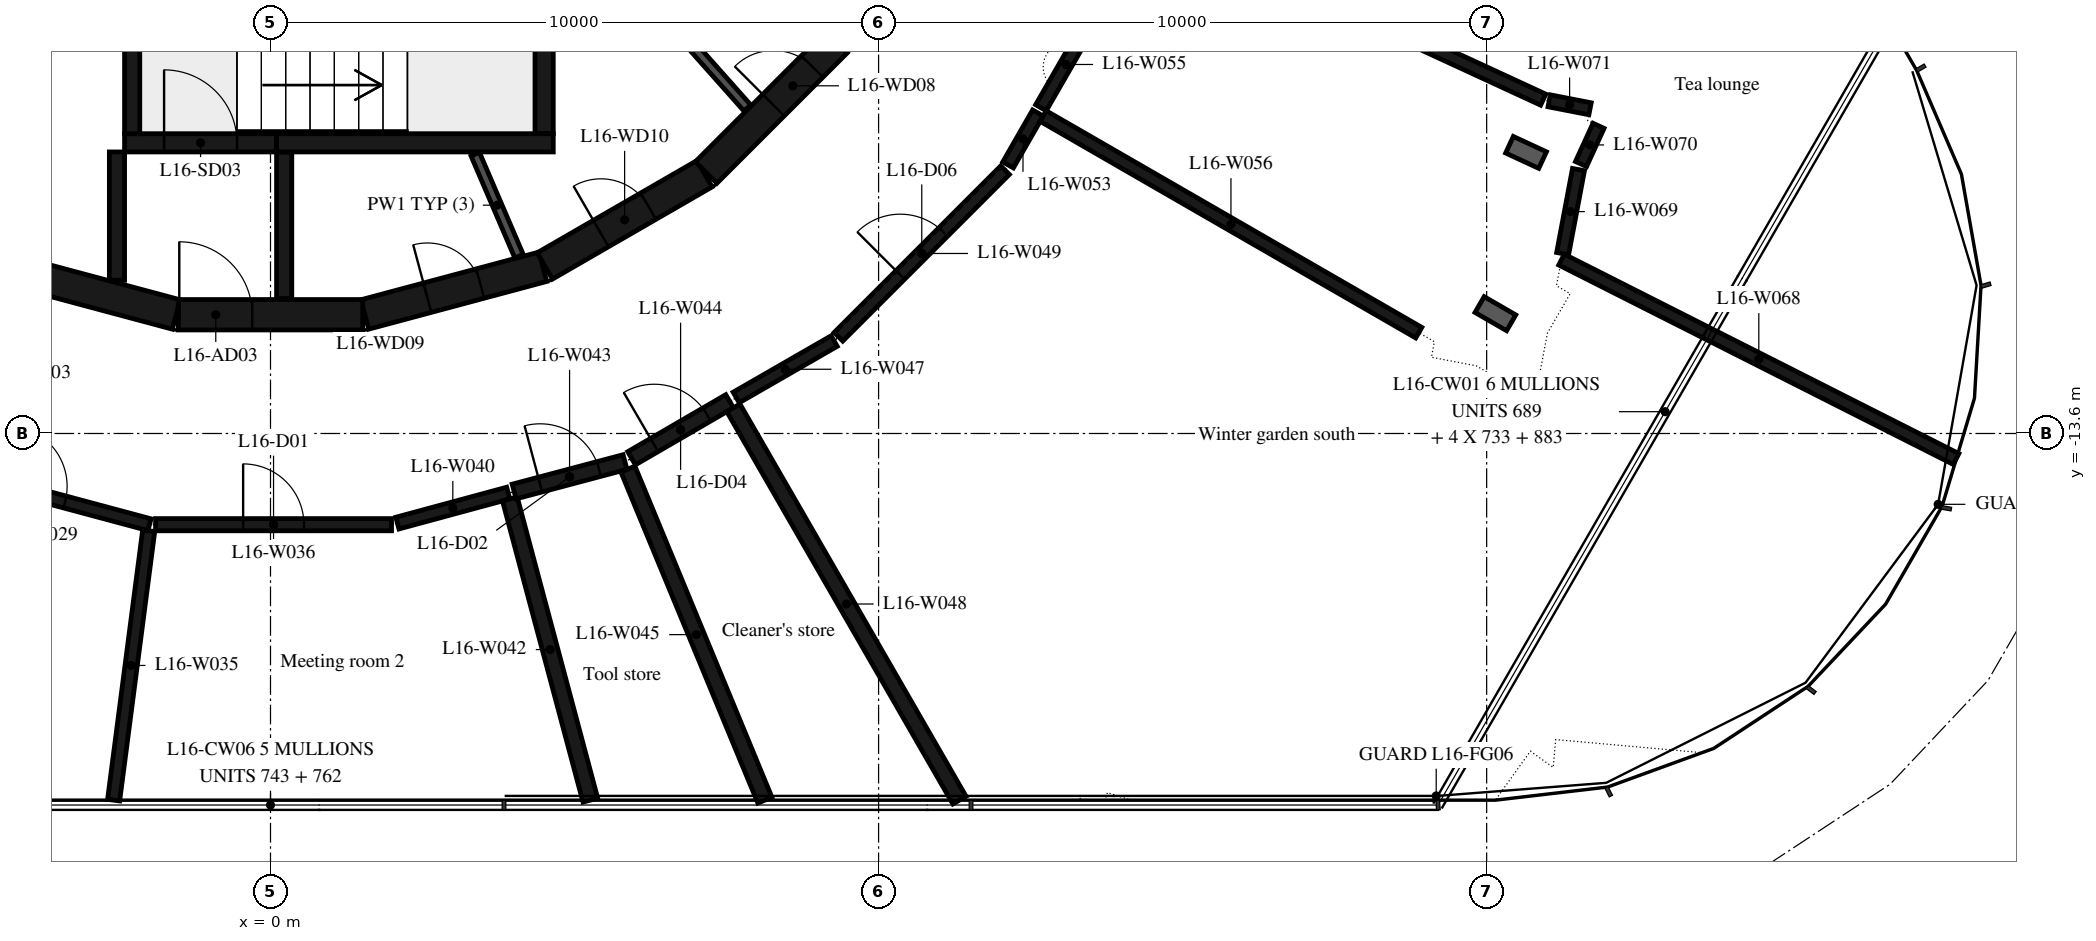
"""IFC4 building model, lengths in metres.
Left out: names, types, materials, properties, quantities, classifications, styles, units other than length and angle.
Written with IfcOpenShell. Run it as: python <this file> out.ifc"""

import sys

from ifc_helpers import new_model, si_unit, direction, frame, frame_2d, origin, place, context, subcontext, project, spatial, rectangle, extrude, element, fill, save


model = new_model("IFC4")
c1 = context("Model", 3, precision=1e-05, world=origin(), true_north=direction((0.0, 1.0)))
c2 = subcontext(c1, "Body", "Model", "MODEL_VIEW")
j1 = project(units=[si_unit("LENGTHUNIT", "METRE"), si_unit("PLANEANGLEUNIT", "RADIAN")], contexts=[c1])
p1 = place(None, origin())
s1 = spatial("IfcSite", under=j1, at=p1, CompositionType="ELEMENT")
p2 = place(p1, origin())
s2 = spatial("IfcBuilding", under=s1, at=p2, CompositionType="ELEMENT")
p3 = place(p2, frame((0.0, 0.0, 69.9)))
s3 = spatial("IfcBuildingStorey", under=s2, at=p3, CompositionType="ELEMENT", Elevation=69.9)
p4 = place(p3, frame((1.55, -11.643, 0.0), z_axis=(0.0, 0.0, 1.0), x_axis=(0.965948410781, 0.258734743916, 0.0)))
e1 = element("IfcWall", 1, at=p4, inside=s3, PredefinedType="SHEAR", context=c2, shape_type="SweptSolid", body=[
    extrude(rectangle(XDim=3.033, YDim=0.5, at=frame_2d((1.516, 0.0))), origin(), (0.0, 0.0, 1.0), 6.35),
])
p5 = place(p4, frame((1.066, 0.0, 0.0)))
e2 = element("IfcOpeningElement", 2, at=p5, cuts=e1, PredefinedType="OPENING", context=c2, shape_type="SweptSolid", body=[
    extrude(rectangle(XDim=0.9, YDim=2.1, at=frame_2d((0.45, 1.05))), frame((0.0, 0.26, 0.0), z_axis=(0.0, -1.0, 0.0), x_axis=(1.0, 0.0, 0.0)), (0.0, 0.0, 1.0), 0.52),
])
p6 = place(p3, frame((4.51, -10.845, 0.0), z_axis=(0.0, 0.0, 1.0), x_axis=(0.865975092491, 0.500087131594, 0.0)))
e3 = element("IfcWall", 3, at=p6, inside=s3, PredefinedType="SHEAR", context=c2, shape_type="SweptSolid", body=[
    extrude(rectangle(XDim=3.033, YDim=0.5, at=frame_2d((1.516, 0.0))), origin(), (0.0, 0.0, 1.0), 6.35),
])
p7 = place(p6, frame((1.066, 0.0, 0.0)))
e4 = element("IfcOpeningElement", 4, at=p7, cuts=e3, PredefinedType="OPENING", context=c2, shape_type="SweptSolid", body=[
    extrude(rectangle(XDim=0.9, YDim=2.1, at=frame_2d((0.45, 1.05))), frame((0.0, 0.26, 0.0), z_axis=(0.0, -1.0, 0.0), x_axis=(1.0, 0.0, 0.0)), (0.0, 0.0, 1.0), 0.52),
])
p8 = place(p3, frame((7.164, -9.308, 0.0), z_axis=(0.0, 0.0, 1.0), x_axis=(0.707106781187, 0.707106781187, 0.0)))
e5 = element("IfcWall", 5, at=p8, inside=s3, PredefinedType="SHEAR", context=c2, shape_type="SweptSolid", body=[
    extrude(rectangle(XDim=3.032, YDim=0.5, at=frame_2d((1.516, 0.0))), origin(), (0.0, 0.0, 1.0), 6.35),
])
p9 = place(p8, frame((1.566, 0.0, 0.0)))
e6 = element("IfcOpeningElement", 6, at=p9, cuts=e5, PredefinedType="OPENING", context=c2, shape_type="SweptSolid", body=[
    extrude(rectangle(XDim=0.9, YDim=2.1, at=frame_2d((0.45, 1.05))), frame((0.0, 0.26, 0.0), z_axis=(0.0, -1.0, 0.0), x_axis=(1.0, 0.0, 0.0)), (0.0, 0.0, 1.0), 0.52),
])
p10 = place(p3, frame((-4.479, -10.858, 0.0), z_axis=(0.0, 0.0, 1.0), x_axis=(0.965948410781, -0.258734743916, 0.0)))
e7 = element("IfcWall", 7, at=p10, inside=s3, PredefinedType="SHEAR", context=c2, shape_type="SweptSolid", body=[
    extrude(rectangle(XDim=3.033, YDim=0.5, at=frame_2d((1.516, 0.0))), origin(), (0.0, 0.0, 1.0), 6.35),
])
p11 = place(p3, frame((-1.516, -11.647, 0.0), z_axis=(0.0, 0.0, 1.0), x_axis=(1.0, 0.0, 0.0)))
e8 = element("IfcWall", 8, at=p11, inside=s3, PredefinedType="SHEAR", context=c2, shape_type="SweptSolid", body=[
    extrude(rectangle(XDim=3.033, YDim=0.5, at=frame_2d((1.516, 0.0))), origin(), (0.0, 0.0, 1.0), 6.35),
])
p12 = place(p11, frame((0.016, 0.0, 0.0)))
e9 = element("IfcOpeningElement", 9, at=p12, cuts=e8, PredefinedType="OPENING", context=c2, shape_type="SweptSolid", body=[
    extrude(rectangle(XDim=1.2, YDim=2.1, at=frame_2d((0.6, 1.05))), frame((0.0, 0.26, 0.0), z_axis=(0.0, -1.0, 0.0), x_axis=(1.0, 0.0, 0.0)), (0.0, 0.0, 1.0), 0.52),
])
p13 = place(p3, frame((-2.275, -8.67, 0.0), z_axis=(0.0, 0.0, 1.0), x_axis=(0.0, 1.0, 0.0)))
e10 = element("IfcWall", 10, at=p13, inside=s3, PredefinedType="SHEAR", context=c2, shape_type="SweptSolid", body=[
    extrude(rectangle(XDim=3.32, YDim=0.25, at=frame_2d((1.66, 0.0))), origin(), (0.0, 0.0, 1.0), 6.35),
])
p14 = place(p3, frame((4.5, -8.67, 0.0), z_axis=(0.0, 0.0, 1.0), x_axis=(0.0, 1.0, 0.0)))
e11 = element("IfcWall", 11, at=p14, inside=s3, PredefinedType="SHEAR", context=c2, shape_type="SweptSolid", body=[
    extrude(rectangle(XDim=3.32, YDim=0.3, at=frame_2d((1.66, 0.0))), origin(), (0.0, 0.0, 1.0), 6.35),
])
p15 = place(p3, frame((0.1, -8.82, 0.0), z_axis=(0.0, 0.0, 1.0), x_axis=(1.0, 0.0, 0.0)))
e12 = element("IfcWall", 12, at=p15, inside=s3, PredefinedType="SHEAR", context=c2, shape_type="SweptSolid", body=[
    extrude(rectangle(XDim=4.55, YDim=0.3, at=frame_2d((2.275, 0.0))), origin(), (0.0, 0.0, 1.0), 6.35),
])
p16 = place(p3, frame((-2.4, -8.82, 0.0), z_axis=(0.0, 0.0, 1.0), x_axis=(1.0, 0.0, 0.0)))
e13 = element("IfcWall", 13, at=p16, inside=s3, PredefinedType="SHEAR", context=c2, shape_type="SweptSolid", body=[
    extrude(rectangle(XDim=2.5, YDim=0.3, at=frame_2d((1.25, 0.0))), origin(), (0.0, 0.0, 1.0), 6.35),
])
p17 = place(p16, frame((0.65, 0.0, 0.0)))
e14 = element("IfcOpeningElement", 14, at=p17, cuts=e13, PredefinedType="OPENING", context=c2, shape_type="SweptSolid", body=[
    extrude(rectangle(XDim=1.2, YDim=2.1, at=frame_2d((0.6, 1.05))), frame((0.0, 0.16, 0.0), z_axis=(0.0, -1.0, 0.0), x_axis=(1.0, 0.0, 0.0)), (0.0, 0.0, 1.0), 0.32),
])
p18 = place(p3, frame((-2.525, -8.97, 0.0), z_axis=(0.0, 0.0, 1.0), x_axis=(0.0, -1.0, 0.0)))
e15 = element("IfcWall", 15, at=p18, inside=s3, PredefinedType="SHEAR", context=c2, shape_type="SweptSolid", body=[
    extrude(rectangle(XDim=2.11, YDim=0.25, at=frame_2d((1.055, 0.0))), origin(), (0.0, 0.0, 1.0), 6.35),
])
p19 = place(p3, frame((0.225, -8.97, 0.0), z_axis=(0.0, 0.0, 1.0), x_axis=(0.0, -1.0, 0.0)))
e16 = element("IfcWall", 16, at=p19, inside=s3, PredefinedType="SHEAR", context=c2, shape_type="SweptSolid", body=[
    extrude(rectangle(XDim=2.41, YDim=0.25, at=frame_2d((1.205, 0.0))), origin(), (0.0, 0.0, 1.0), 6.35),
])
p20 = place(p3, frame((7.842, -8.248, 0.0), z_axis=(0.0, 0.0, 1.0), x_axis=(-0.66446128181, 0.747322691329, 0.0)))
e17 = element("IfcWall", 17, at=p20, inside=s3, PredefinedType="PARTITIONING", context=c2, shape_type="SweptSolid", body=[
    extrude(rectangle(XDim=4.198, YDim=0.15, at=frame_2d((2.099, 0.0))), origin(), (0.0, 0.0, 1.0), 6.35),
])
p21 = place(p3, frame((3.367, -9.007, 0.0), z_axis=(0.0, 0.0, 1.0), x_axis=(0.394387482265, -0.918944238696, 0.0)))
e18 = element("IfcWall", 18, at=p21, inside=s3, PredefinedType="PARTITIONING", context=c2, shape_type="SweptSolid", body=[
    extrude(rectangle(XDim=1.825, YDim=0.15, at=frame_2d((0.913, 0.0))), origin(), (0.0, 0.0, 1.0), 6.35),
])
p22 = place(p3, frame((-5.733, -14.096, 0.0), z_axis=(0.0, 0.0, 1.0), x_axis=(0.96585437197, -0.259085569159, 0.0)))
e19 = element("IfcWall", 19, at=p22, inside=s3, PredefinedType="PARTITIONING", context=c2, shape_type="SweptSolid", body=[
    extrude(rectangle(XDim=3.876, YDim=0.2, at=frame_2d((1.938, 0.0))), origin(), (0.0, 0.0, 1.0), 6.35),
])
p23 = place(p22, frame((1.438, 0.0, 0.0)))
e20 = element("IfcOpeningElement", 20, at=p23, cuts=e19, PredefinedType="OPENING", context=c2, shape_type="SweptSolid", body=[
    extrude(rectangle(XDim=1.0, YDim=2.1, at=frame_2d((0.5, 1.05))), frame((0.0, 0.11, 0.0), z_axis=(0.0, -1.0, 0.0), x_axis=(1.0, 0.0, 0.0)), (0.0, 0.0, 1.0), 0.22),
])
p24 = place(p3, frame((-2.003, -15.199, 0.0), z_axis=(0.0, 0.0, 1.0), x_axis=(-0.129170993983, -0.991622334517, 0.0)))
e21 = element("IfcWall", 21, at=p24, inside=s3, PredefinedType="PARTITIONING", context=c2, shape_type="SweptSolid", body=[
    extrude(rectangle(XDim=4.468, YDim=0.2, at=frame_2d((2.234, 0.0))), origin(), (0.0, 0.0, 1.0), 6.35),
])
p25 = place(p3, frame((-1.89, -15.1, 0.0), z_axis=(0.0, 0.0, 1.0), x_axis=(1.0, 0.0, 0.0)))
e22 = element("IfcWall", 22, at=p25, inside=s3, PredefinedType="PARTITIONING", context=c2, shape_type="SweptSolid", body=[
    extrude(rectangle(XDim=3.88, YDim=0.2, at=frame_2d((1.94, 0.0))), origin(), (0.0, 0.0, 1.0), 6.35),
])
p26 = place(p25, frame((1.44, 0.0, 0.0)))
e23 = element("IfcOpeningElement", 23, at=p26, cuts=e22, PredefinedType="OPENING", context=c2, shape_type="SweptSolid", body=[
    extrude(rectangle(XDim=1.0, YDim=2.1, at=frame_2d((0.5, 1.05))), frame((0.0, 0.11, 0.0), z_axis=(0.0, -1.0, 0.0), x_axis=(1.0, 0.0, 0.0)), (0.0, 0.0, 1.0), 0.22),
])
p27 = place(p3, frame((2.086, -15.074, 0.0), z_axis=(0.0, 0.0, 1.0), x_axis=(0.965221616417, 0.261433033875, 0.0)))
e24 = element("IfcWall", 24, at=p27, inside=s3, PredefinedType="PARTITIONING", context=c2, shape_type="SweptSolid", body=[
    extrude(rectangle(XDim=1.889, YDim=0.2, at=frame_2d((0.945, 0.0))), origin(), (0.0, 0.0, 1.0), 6.35),
])
p28 = place(p3, frame((3.936, -14.677, 0.0), z_axis=(0.0, 0.0, 1.0), x_axis=(0.258267180327, -0.966073529068, 0.0)))
e25 = element("IfcWall", 25, at=p28, inside=s3, PredefinedType="PARTITIONING", context=c2, shape_type="SweptSolid", body=[
    extrude(rectangle(XDim=5.127, YDim=0.25, at=frame_2d((2.564, 0.0))), origin(), (0.0, 0.0, 1.0), 6.35),
])
p29 = place(p3, frame((4.007, -14.554, 0.0), z_axis=(0.0, 0.0, 1.0), x_axis=(0.966483621923, 0.256728277667, 0.0)))
e26 = element("IfcWall", 26, at=p29, inside=s3, PredefinedType="PARTITIONING", context=c2, shape_type="SweptSolid", body=[
    extrude(rectangle(XDim=1.887, YDim=0.25, at=frame_2d((0.943, 0.0))), origin(), (0.0, 0.0, 1.0), 6.35),
])
p30 = place(p29, frame((0.443, 0.0, 0.0)))
e27 = element("IfcOpeningElement", 27, at=p30, cuts=e26, PredefinedType="OPENING", context=c2, shape_type="SweptSolid", body=[
    extrude(rectangle(XDim=1.0, YDim=2.1, at=frame_2d((0.5, 1.05))), frame((0.0, 0.135, 0.0), z_axis=(0.0, -1.0, 0.0), x_axis=(1.0, 0.0, 0.0)), (0.0, 0.0, 1.0), 0.27),
])
p31 = place(p3, frame((5.938, -14.007, 0.0), z_axis=(0.0, 0.0, 1.0), x_axis=(0.864561429024, 0.502527148962, 0.0)))
e28 = element("IfcWall", 28, at=p31, inside=s3, PredefinedType="PARTITIONING", context=c2, shape_type="SweptSolid", body=[
    extrude(rectangle(XDim=1.865, YDim=0.25, at=frame_2d((0.932, 0.0))), origin(), (0.0, 0.0, 1.0), 6.35),
])
p32 = place(p31, frame((0.432, 0.0, 0.0)))
e29 = element("IfcOpeningElement", 29, at=p32, cuts=e28, PredefinedType="OPENING", context=c2, shape_type="SweptSolid", body=[
    extrude(rectangle(XDim=1.0, YDim=2.1, at=frame_2d((0.5, 1.05))), frame((0.0, 0.135, 0.0), z_axis=(0.0, -1.0, 0.0), x_axis=(1.0, 0.0, 0.0)), (0.0, 0.0, 1.0), 0.27),
])
p33 = place(p3, frame((5.878, -14.186, 0.0), z_axis=(0.0, 0.0, 1.0), x_axis=(0.382260291958, -0.924054689503, 0.0)))
e30 = element("IfcWall", 30, at=p33, inside=s3, PredefinedType="PARTITIONING", context=c2, shape_type="SweptSolid", body=[
    extrude(rectangle(XDim=5.892, YDim=0.25, at=frame_2d((2.946, 0.0))), origin(), (0.0, 0.0, 1.0), 6.35),
])
p34 = place(p3, frame((7.658, -13.008, 0.0), z_axis=(0.0, 0.0, 1.0), x_axis=(0.86671190811, 0.498809049979, 0.0)))
e31 = element("IfcWall", 31, at=p34, inside=s3, PredefinedType="PARTITIONING", context=c2, shape_type="SweptSolid", body=[
    extrude(rectangle(XDim=1.859, YDim=0.2, at=frame_2d((0.93, 0.0))), origin(), (0.0, 0.0, 1.0), 6.35),
])
p35 = place(p3, frame((7.612, -13.178, 0.0), z_axis=(0.0, 0.0, 1.0), x_axis=(0.499285274142, -0.866437657899, 0.0)))
e32 = element("IfcWall", 32, at=p35, inside=s3, PredefinedType="PARTITIONING", context=c2, shape_type="SweptSolid", body=[
    extrude(rectangle(XDim=7.446, YDim=0.25, at=frame_2d((3.723, 0.0))), origin(), (0.0, 0.0, 1.0), 6.35),
])
p36 = place(p3, frame((9.341, -12.009, 0.0), z_axis=(0.0, 0.0, 1.0), x_axis=(0.707106781187, 0.707106781187, 0.0)))
e33 = element("IfcWall", 33, at=p36, inside=s3, PredefinedType="PARTITIONING", context=c2, shape_type="SweptSolid", body=[
    extrude(rectangle(XDim=3.874, YDim=0.2, at=frame_2d((1.937, 0.0))), origin(), (0.0, 0.0, 1.0), 6.35),
])
p37 = place(p36, frame((1.437, 0.0, 0.0)))
e34 = element("IfcOpeningElement", 34, at=p37, cuts=e33, PredefinedType="OPENING", context=c2, shape_type="SweptSolid", body=[
    extrude(rectangle(XDim=1.0, YDim=2.1, at=frame_2d((0.5, 1.05))), frame((0.0, 0.11, 0.0), z_axis=(0.0, -1.0, 0.0), x_axis=(1.0, 0.0, 0.0)), (0.0, 0.0, 1.0), 0.22),
])
p38 = place(p3, frame((12.13, -9.183, 0.0), z_axis=(0.0, 0.0, 1.0), x_axis=(0.498168116644, 0.867080461987, 0.0)))
e35 = element("IfcWall", 35, at=p38, inside=s3, PredefinedType="PARTITIONING", context=c2, shape_type="SweptSolid", body=[
    extrude(rectangle(XDim=0.984, YDim=0.2, at=frame_2d((0.492, 0.0))), origin(), (0.0, 0.0, 1.0), 6.35),
])
p39 = place(p3, frame((12.67, -8.243, 0.0), z_axis=(0.0, 0.0, 1.0), x_axis=(0.499224871441, 0.866472462191, 0.0)))
e36 = element("IfcWall", 36, at=p39, inside=s3, PredefinedType="PARTITIONING", context=c2, shape_type="SweptSolid", body=[
    extrude(rectangle(XDim=1.643, YDim=0.2, at=frame_2d((0.821, 0.0))), origin(), (0.0, 0.0, 1.0), 6.35),
])
p40 = place(p3, frame((12.707, -8.38, 0.0), z_axis=(0.0, 0.0, 1.0), x_axis=(0.866276777452, -0.49956435506, 0.0)))
e37 = element("IfcWall", 37, at=p40, inside=s3, PredefinedType="PARTITIONING", context=c2, shape_type="SweptSolid", body=[
    extrude(rectangle(XDim=7.13, YDim=0.2, at=frame_2d((3.565, 0.0))), origin(), (0.0, 0.0, 1.0), 6.35),
])
p41 = place(p3, frame((20.93, -8.11, 0.0), z_axis=(0.0, 0.0, 1.0), x_axis=(-0.907916848499, 0.419150326507, 0.0)))
e38 = element("IfcWall", 38, at=p41, inside=s3, PredefinedType="PARTITIONING", context=c2, shape_type="SweptSolid", body=[
    extrude(rectangle(XDim=7.224, YDim=0.2, at=frame_2d((3.612, 0.0))), origin(), (0.0, 0.0, 1.0), 6.35),
])
p42 = place(p3, frame((21.231, -10.74, 0.0), z_axis=(0.0, 0.0, 1.0), x_axis=(0.892491459774, -0.451064290573, 0.0)))
e39 = element("IfcWall", 39, at=p42, inside=s3, PredefinedType="PARTITIONING", context=c2, shape_type="SweptSolid", body=[
    extrude(rectangle(XDim=7.271, YDim=0.2, at=frame_2d((3.635, 0.0))), origin(), (0.0, 0.0, 1.0), 6.35),
])
p43 = place(p3, frame((21.51, -9.26, 0.0), z_axis=(0.0, 0.0, 1.0), x_axis=(-0.185189665268, -0.982702797329, 0.0)))
e40 = element("IfcWall", 40, at=p43, inside=s3, PredefinedType="PARTITIONING", context=c2, shape_type="SweptSolid", body=[
    extrude(rectangle(XDim=1.407, YDim=0.2, at=frame_2d((0.703, 0.0))), origin(), (0.0, 0.0, 1.0), 6.35),
])
p44 = place(p3, frame((21.552, -9.169, 0.0), z_axis=(0.0, 0.0, 1.0), x_axis=(0.416618269339, 0.909081524206, 0.0)))
e41 = element("IfcWall", 41, at=p44, inside=s3, PredefinedType="PARTITIONING", context=c2, shape_type="SweptSolid", body=[
    extrude(rectangle(XDim=0.692, YDim=0.2, at=frame_2d((0.346, 0.0))), origin(), (0.0, 0.0, 1.0), 6.35),
])
p45 = place(p3, frame((21.7, -8.26, 0.0), z_axis=(0.0, 0.0, 1.0), x_axis=(-0.981555941324, 0.191175139735, 0.0)))
e42 = element("IfcWall", 42, at=p45, inside=s3, PredefinedType="PARTITIONING", context=c2, shape_type="SweptSolid", body=[
    extrude(rectangle(XDim=0.685, YDim=0.2, at=frame_2d((0.342, 0.0))), origin(), (0.0, 0.0, 1.0), 6.35),
])
p46 = place(p17, origin())
e43 = element("IfcDoor", 43, at=p46, inside=s3, OperationType="SINGLE_SWING_LEFT", PredefinedType="DOOR", context=c2, shape_type="SweptSolid", body=[
    extrude(rectangle(XDim=1.2, YDim=2.1, at=frame_2d((0.6, 1.05))), frame((0.0, 0.025, 0.0), z_axis=(0.0, -1.0, 0.0), x_axis=(1.0, 0.0, 0.0)), (0.0, 0.0, 1.0), 0.05),
])
fill(e14, e43)
p47 = place(p12, origin())
e44 = element("IfcDoor", 44, at=p47, inside=s3, OperationType="SINGLE_SWING_RIGHT", PredefinedType="DOOR", context=c2, shape_type="SweptSolid", body=[
    extrude(rectangle(XDim=1.2, YDim=2.1, at=frame_2d((0.6, 1.05))), frame((0.0, 0.025, 0.0), z_axis=(0.0, -1.0, 0.0), x_axis=(1.0, 0.0, 0.0)), (0.0, 0.0, 1.0), 0.05),
])
fill(e9, e44)
p48 = place(p9, origin())
e45 = element("IfcDoor", 45, at=p48, inside=s3, OperationType="SINGLE_SWING_LEFT", PredefinedType="DOOR", context=c2, shape_type="SweptSolid", body=[
    extrude(rectangle(XDim=0.9, YDim=2.1, at=frame_2d((0.45, 1.05))), frame((0.0, 0.025, 0.0), z_axis=(0.0, -1.0, 0.0), x_axis=(1.0, 0.0, 0.0)), (0.0, 0.0, 1.0), 0.05),
])
fill(e6, e45)
p49 = place(p5, origin())
e46 = element("IfcDoor", 46, at=p49, inside=s3, OperationType="SINGLE_SWING_RIGHT", PredefinedType="DOOR", context=c2, shape_type="SweptSolid", body=[
    extrude(rectangle(XDim=0.9, YDim=2.1, at=frame_2d((0.45, 1.05))), frame((0.0, 0.025, 0.0), z_axis=(0.0, -1.0, 0.0), x_axis=(1.0, 0.0, 0.0)), (0.0, 0.0, 1.0), 0.05),
])
fill(e2, e46)
p50 = place(p7, origin())
e47 = element("IfcDoor", 47, at=p50, inside=s3, OperationType="SINGLE_SWING_LEFT", PredefinedType="DOOR", context=c2, shape_type="SweptSolid", body=[
    extrude(rectangle(XDim=0.9, YDim=2.1, at=frame_2d((0.45, 1.05))), frame((0.0, 0.025, 0.0), z_axis=(0.0, -1.0, 0.0), x_axis=(1.0, 0.0, 0.0)), (0.0, 0.0, 1.0), 0.05),
])
fill(e4, e47)
p51 = place(p26, origin())
e48 = element("IfcDoor", 48, at=p51, inside=s3, OperationType="SINGLE_SWING_LEFT", PredefinedType="DOOR", context=c2, shape_type="SweptSolid", body=[
    extrude(rectangle(XDim=1.0, YDim=2.1, at=frame_2d((0.5, 1.05))), frame((0.0, 0.025, 0.0), z_axis=(0.0, -1.0, 0.0), x_axis=(1.0, 0.0, 0.0)), (0.0, 0.0, 1.0), 0.05),
])
fill(e23, e48)
p52 = place(p30, origin())
e49 = element("IfcDoor", 49, at=p52, inside=s3, OperationType="SINGLE_SWING_LEFT", PredefinedType="DOOR", context=c2, shape_type="SweptSolid", body=[
    extrude(rectangle(XDim=1.0, YDim=2.1, at=frame_2d((0.5, 1.05))), frame((0.0, 0.025, 0.0), z_axis=(0.0, -1.0, 0.0), x_axis=(1.0, 0.0, 0.0)), (0.0, 0.0, 1.0), 0.05),
])
fill(e27, e49)
p53 = place(p23, origin())
e50 = element("IfcDoor", 50, at=p53, inside=s3, OperationType="SINGLE_SWING_LEFT", PredefinedType="DOOR", context=c2, shape_type="SweptSolid", body=[
    extrude(rectangle(XDim=1.0, YDim=2.1, at=frame_2d((0.5, 1.05))), frame((0.0, 0.025, 0.0), z_axis=(0.0, -1.0, 0.0), x_axis=(1.0, 0.0, 0.0)), (0.0, 0.0, 1.0), 0.05),
])
fill(e20, e50)
p54 = place(p32, origin())
e51 = element("IfcDoor", 51, at=p54, inside=s3, OperationType="SINGLE_SWING_LEFT", PredefinedType="DOOR", context=c2, shape_type="SweptSolid", body=[
    extrude(rectangle(XDim=1.0, YDim=2.1, at=frame_2d((0.5, 1.05))), frame((0.0, 0.025, 0.0), z_axis=(0.0, -1.0, 0.0), x_axis=(1.0, 0.0, 0.0)), (0.0, 0.0, 1.0), 0.05),
])
fill(e29, e51)
p55 = place(p37, origin())
e52 = element("IfcDoor", 52, at=p55, inside=s3, OperationType="SINGLE_SWING_LEFT", PredefinedType="DOOR", context=c2, shape_type="SweptSolid", body=[
    extrude(rectangle(XDim=1.0, YDim=2.1, at=frame_2d((0.5, 1.05))), frame((0.0, 0.025, 0.0), z_axis=(0.0, -1.0, 0.0), x_axis=(1.0, 0.0, 0.0)), (0.0, 0.0, 1.0), 0.05),
])
fill(e34, e52)
save(model, sys.argv[1])
